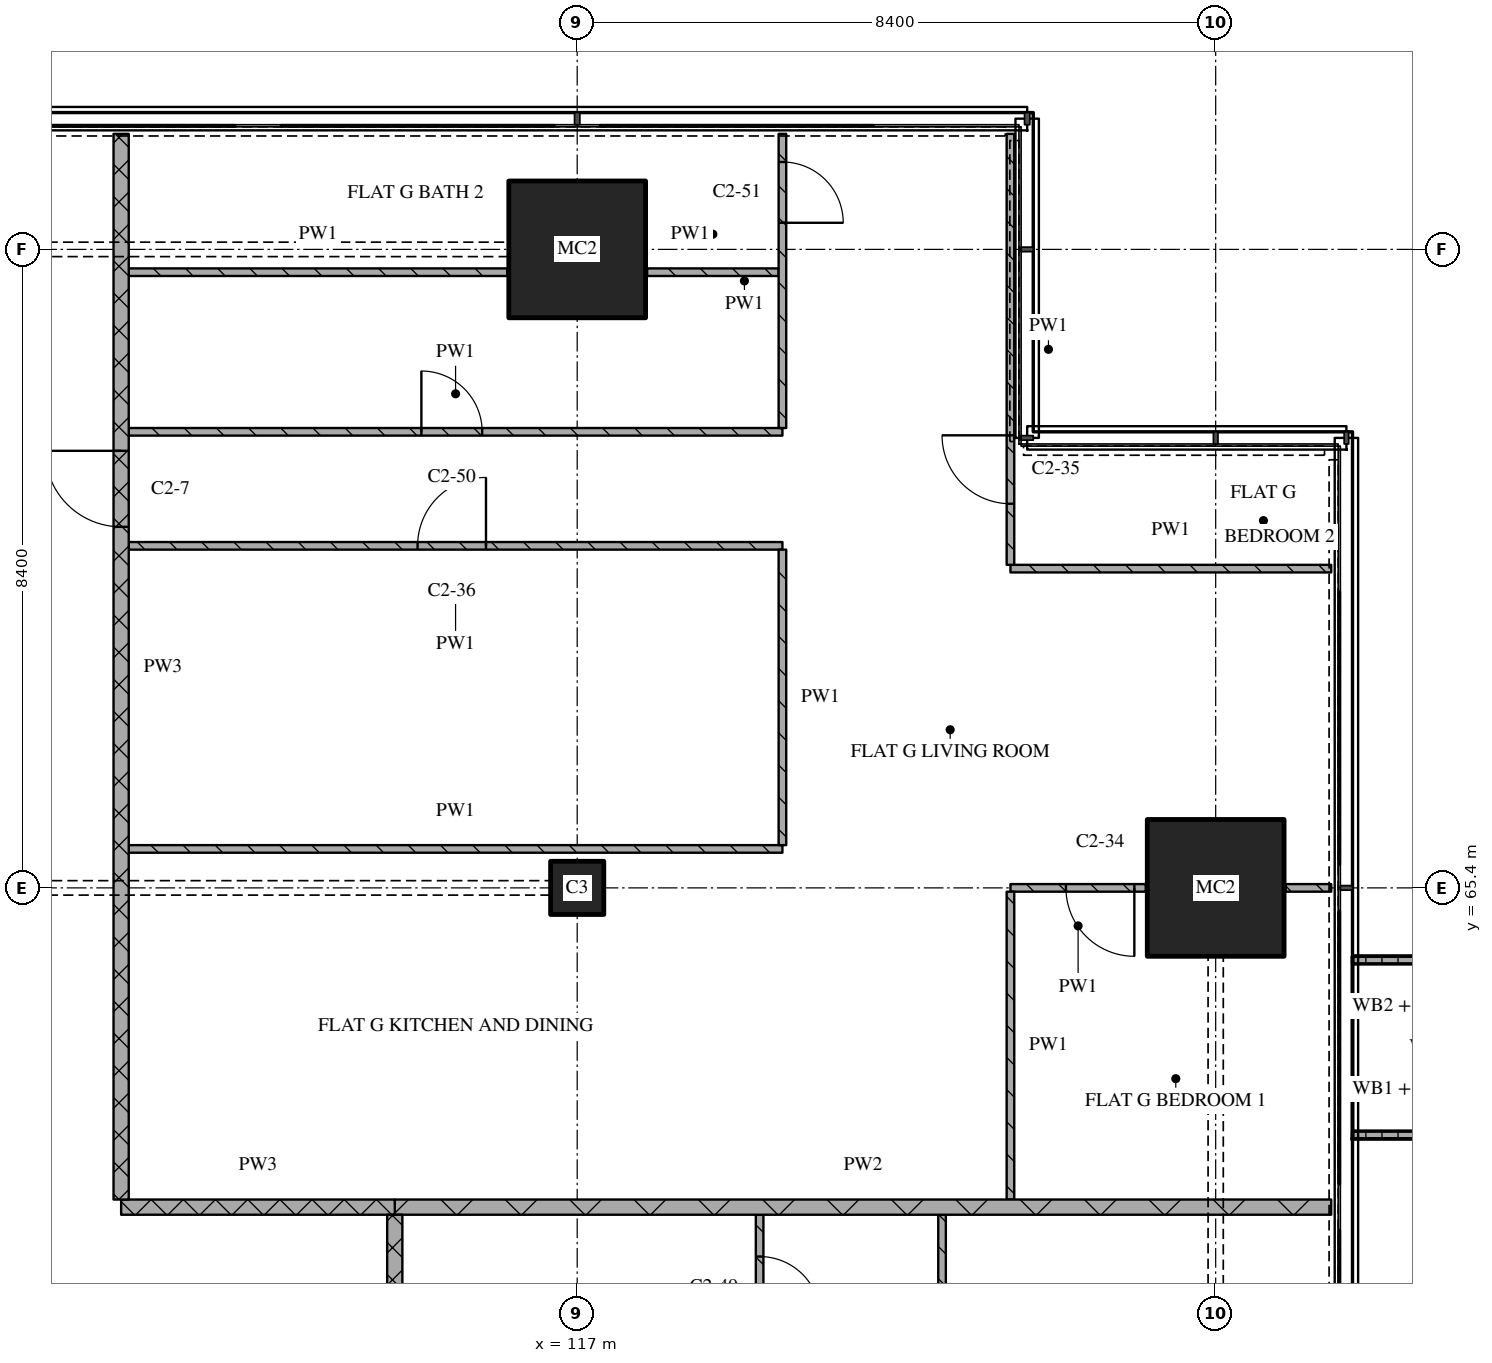
"""IFC4 building model, lengths in metres.
Left out: names, types, materials, properties, quantities, classifications, styles, units other than length and angle.
Written with IfcOpenShell. Run it as: python <this file> out.ifc"""

import sys

from ifc_helpers import new_model, si_unit, direction, frame, frame_2d, origin, origin_2d, place, context, subcontext, project, spatial, polyline, rectangle, outline, extrude, element, fill, save


model = new_model("IFC4")
c1 = context("Model", 3, precision=1e-05, world=origin(), true_north=direction((0.0, 1.0)))
c2 = subcontext(c1, "Body", "Model", "MODEL_VIEW")
j1 = project(units=[si_unit("LENGTHUNIT", "METRE"), si_unit("PLANEANGLEUNIT", "RADIAN")], contexts=[c1])
p1 = place(None, origin())
s1 = spatial("IfcSite", under=j1, at=p1, CompositionType="ELEMENT")
p2 = place(p1, origin())
s2 = spatial("IfcBuilding", under=s1, at=p2, CompositionType="ELEMENT")
p3 = place(p2, frame((0.0, 0.0, 158.25)))
s3 = spatial("IfcBuildingStorey", under=s2, at=p3, CompositionType="ELEMENT", Elevation=158.25)
p4 = place(p3, frame((117.0, 65.4, 0.0), z_axis=(0.0, 0.0, 1.0), x_axis=(1.0, 0.0, 0.0)))
e1 = element("IfcColumn", 1, at=p4, inside=s3, PredefinedType="COLUMN", context=c2, shape_type="SweptSolid", body=[
    extrude(rectangle(XDim=0.7, YDim=0.7, at=origin_2d()), origin(), (0.0, 0.0, 1.0), 3.6),
])
for number, where, z_axis, x_axis in (
    (2, (117.0, 73.8, 0.0), (0.0, 0.0, 1.0), (1.0, 0.0, 0.0)),
    (3, (125.4, 65.4, 0.0), (0.0, 0.0, 1.0), (1.0, 0.0, 0.0)),
):
    element("IfcColumn", number, at=place(p3, frame(where, z_axis=z_axis, x_axis=x_axis)), inside=s3, PredefinedType="COLUMN", context=c2, shape_type="SweptSolid", body=[
        extrude(rectangle(XDim=1.8, YDim=1.8, at=origin_2d()), origin(), (0.0, 0.0, 1.0), 3.6),
    ])
p5 = place(p3, origin())
e4 = element("IfcWall", 4, at=p5, inside=s3, PredefinedType="SOLIDWALL", context=c2, shape_type="SweptSolid", body=[
    extrude(outline(polyline([(127.2, 62.1), (127.2, 62.2), (128.7, 62.2), (128.7, 64.4), (127.2, 64.4), (127.2, 64.5), (128.8, 64.5), (128.8, 62.1), (127.2, 62.1)])), origin(), (0.0, 0.0, 1.0), 1.0),
])
p6 = place(p3, frame((111.0, 61.2, 0.0), z_axis=(0.0, 0.0, 1.0), x_axis=(1.0, 0.0, 0.0)))
e5 = element("IfcWall", 5, at=p6, inside=s3, PredefinedType="PARTITIONING", context=c2, shape_type="SweptSolid", body=[
    extrude(rectangle(XDim=3.6, YDim=0.2, at=frame_2d((1.8, 0.0))), origin(), (0.0, 0.0, 1.0), 3.32),
])
p7 = place(p3, frame((114.6, 61.2, 0.0), z_axis=(0.0, 0.0, 1.0), x_axis=(1.0, 0.0, 0.0)))
e6 = element("IfcWall", 6, at=p7, inside=s3, PredefinedType="PARTITIONING", context=c2, shape_type="SweptSolid", body=[
    extrude(rectangle(XDim=12.32, YDim=0.2, at=frame_2d((6.16, 0.0))), origin(), (0.0, 0.0, 1.0), 3.32),
])
p8 = place(p3, frame((124.48, 65.4, 0.0), z_axis=(0.0, 0.0, 1.0), x_axis=(-1.0, 0.0, 0.0)))
e7 = element("IfcWall", 7, at=p8, inside=s3, PredefinedType="PARTITIONING", context=c2, shape_type="SweptSolid", body=[
    extrude(rectangle(XDim=1.78, YDim=0.1, at=frame_2d((0.89, 0.0))), origin(), (0.0, 0.0, 1.0), 3.32),
])
p9 = place(p8, frame((0.15, 0.0, 0.0)))
e8 = element("IfcOpeningElement", 8, at=p9, cuts=e7, PredefinedType="OPENING", context=c2, shape_type="SweptSolid", body=[
    extrude(rectangle(XDim=0.9, YDim=2.1, at=frame_2d((0.45, 1.05))), frame((0.0, 0.06, 0.0), z_axis=(0.0, -1.0, 0.0), x_axis=(1.0, 0.0, 0.0)), (0.0, 0.0, 1.0), 0.12),
])
p10 = place(p3, frame((126.32, 65.4, 0.0), z_axis=(0.0, 0.0, 1.0), x_axis=(1.0, 0.0, 0.0)))
e9 = element("IfcWall", 9, at=p10, inside=s3, PredefinedType="PARTITIONING", context=c2, shape_type="SweptSolid", body=[
    extrude(rectangle(XDim=0.6, YDim=0.1, at=frame_2d((0.3, 0.0))), origin(), (0.0, 0.0, 1.0), 3.32),
])
p11 = place(p3, frame((111.1, 65.913, 0.0), z_axis=(0.0, 0.0, 1.0), x_axis=(1.0, 0.0, 0.0)))
e10 = element("IfcWall", 10, at=p11, inside=s3, PredefinedType="PARTITIONING", context=c2, shape_type="SweptSolid", body=[
    extrude(rectangle(XDim=8.6, YDim=0.1, at=frame_2d((4.3, 0.0))), origin(), (0.0, 0.0, 1.0), 3.32),
])
p12 = place(p3, frame((122.7, 69.6, 0.0), z_axis=(0.0, 0.0, 1.0), x_axis=(1.0, 0.0, 0.0)))
e11 = element("IfcWall", 11, at=p12, inside=s3, PredefinedType="PARTITIONING", context=c2, shape_type="SweptSolid", body=[
    extrude(rectangle(XDim=4.22, YDim=0.1, at=frame_2d((2.11, 0.0))), origin(), (0.0, 0.0, 1.0), 3.32),
])
p13 = place(p3, frame((119.7, 69.9, 0.0), z_axis=(0.0, 0.0, 1.0), x_axis=(-1.0, 0.0, 0.0)))
e12 = element("IfcWall", 12, at=p13, inside=s3, PredefinedType="PARTITIONING", context=c2, shape_type="SweptSolid", body=[
    extrude(rectangle(XDim=8.6, YDim=0.1, at=frame_2d((4.3, 0.0))), origin(), (0.0, 0.0, 1.0), 3.32),
])
p14 = place(p13, frame((3.9, 0.0, 0.0)))
e13 = element("IfcOpeningElement", 13, at=p14, cuts=e12, PredefinedType="OPENING", context=c2, shape_type="SweptSolid", body=[
    extrude(rectangle(XDim=0.9, YDim=2.1, at=frame_2d((0.45, 1.05))), frame((0.0, 0.06, 0.0), z_axis=(0.0, -1.0, 0.0), x_axis=(1.0, 0.0, 0.0)), (0.0, 0.0, 1.0), 0.12),
])
p15 = place(p3, frame((111.1, 71.4, 0.0), z_axis=(0.0, 0.0, 1.0), x_axis=(1.0, 0.0, 0.0)))
e14 = element("IfcWall", 14, at=p15, inside=s3, PredefinedType="PARTITIONING", context=c2, shape_type="SweptSolid", body=[
    extrude(rectangle(XDim=8.6, YDim=0.1, at=frame_2d((4.3, 0.0))), origin(), (0.0, 0.0, 1.0), 3.32),
])
p16 = place(p15, frame((3.85, 0.0, 0.0)))
e15 = element("IfcOpeningElement", 15, at=p16, cuts=e14, PredefinedType="OPENING", context=c2, shape_type="SweptSolid", body=[
    extrude(rectangle(XDim=0.8, YDim=2.1, at=frame_2d((0.4, 1.05))), frame((0.0, 0.06, 0.0), z_axis=(0.0, -1.0, 0.0), x_axis=(1.0, 0.0, 0.0)), (0.0, 0.0, 1.0), 0.12),
])
p17 = place(p3, frame((111.1, 73.5, 0.0), z_axis=(0.0, 0.0, 1.0), x_axis=(1.0, 0.0, 0.0)))
e16 = element("IfcWall", 16, at=p17, inside=s3, PredefinedType="PARTITIONING", context=c2, shape_type="SweptSolid", body=[
    extrude(rectangle(XDim=4.98, YDim=0.1, at=frame_2d((2.49, 0.0))), origin(), (0.0, 0.0, 1.0), 3.32),
])
p18 = place(p3, frame((117.92, 73.5, 0.0), z_axis=(0.0, 0.0, 1.0), x_axis=(1.0, 0.0, 0.0)))
e17 = element("IfcWall", 17, at=p18, inside=s3, PredefinedType="PARTITIONING", context=c2, shape_type="SweptSolid", body=[
    extrude(rectangle(XDim=1.73, YDim=0.1, at=frame_2d((0.865, 0.0))), origin(), (0.0, 0.0, 1.0), 3.32),
])
p19 = place(p3, frame((111.0, 75.32, 0.0), z_axis=(0.0, 0.0, 1.0), x_axis=(0.0, -1.0, 0.0)))
e18 = element("IfcWall", 18, at=p19, inside=s3, PredefinedType="PARTITIONING", context=c2, shape_type="SweptSolid", body=[
    extrude(rectangle(XDim=14.02, YDim=0.2, at=frame_2d((7.01, 0.0))), origin(), (0.0, 0.0, 1.0), 3.32),
])
p20 = place(p19, frame((4.17, 0.0, 0.0)))
e19 = element("IfcOpeningElement", 19, at=p20, cuts=e18, PredefinedType="OPENING", context=c2, shape_type="SweptSolid", body=[
    extrude(rectangle(XDim=1.0, YDim=2.1, at=frame_2d((0.5, 1.05))), frame((0.0, 0.11, 0.0), z_axis=(0.0, -1.0, 0.0), x_axis=(1.0, 0.0, 0.0)), (0.0, 0.0, 1.0), 0.22),
])
p21 = place(p3, frame((114.6, 61.1, 0.0), z_axis=(0.0, 0.0, 1.0), x_axis=(0.0, -1.0, 0.0)))
e20 = element("IfcWall", 20, at=p21, inside=s3, PredefinedType="PARTITIONING", context=c2, shape_type="SweptSolid", body=[
    extrude(rectangle(XDim=17.8, YDim=0.2, at=frame_2d((8.9, 0.0))), origin(), (0.0, 0.0, 1.0), 3.32),
])
p22 = place(p21, frame((5.25, 0.0, 0.0)))
e21 = element("IfcOpeningElement", 21, at=p22, cuts=e20, PredefinedType="OPENING", context=c2, shape_type="SweptSolid", body=[
    extrude(rectangle(XDim=1.0, YDim=2.1, at=frame_2d((0.5, 1.05))), frame((0.0, 0.11, 0.0), z_axis=(0.0, -1.0, 0.0), x_axis=(1.0, 0.0, 0.0)), (0.0, 0.0, 1.0), 0.22),
])
p23 = place(p3, frame((119.4, 56.15, 0.0), z_axis=(0.0, 0.0, 1.0), x_axis=(0.0, 1.0, 0.0)))
e22 = element("IfcWall", 22, at=p23, inside=s3, PredefinedType="PARTITIONING", context=c2, shape_type="SweptSolid", body=[
    extrude(rectangle(XDim=4.95, YDim=0.1, at=frame_2d((2.475, 0.0))), origin(), (0.0, 0.0, 1.0), 3.32),
])
p24 = place(p23, frame((3.6, 0.0, 0.0)))
e23 = element("IfcOpeningElement", 23, at=p24, cuts=e22, PredefinedType="OPENING", context=c2, shape_type="SweptSolid", body=[
    extrude(rectangle(XDim=0.8, YDim=2.1, at=frame_2d((0.4, 1.05))), frame((0.0, 0.06, 0.0), z_axis=(0.0, -1.0, 0.0), x_axis=(1.0, 0.0, 0.0)), (0.0, 0.0, 1.0), 0.12),
])
p25 = place(p3, frame((119.7, 69.85, 0.0), z_axis=(0.0, 0.0, 1.0), x_axis=(0.0, -1.0, 0.0)))
e24 = element("IfcWall", 24, at=p25, inside=s3, PredefinedType="PARTITIONING", context=c2, shape_type="SweptSolid", body=[
    extrude(rectangle(XDim=3.887, YDim=0.1, at=frame_2d((1.944, 0.0))), origin(), (0.0, 0.0, 1.0), 3.32),
])
p26 = place(p3, frame((119.7, 71.45, 0.0), z_axis=(0.0, 0.0, 1.0), x_axis=(0.0, 1.0, 0.0)))
e25 = element("IfcWall", 25, at=p26, inside=s3, PredefinedType="PARTITIONING", context=c2, shape_type="SweptSolid", body=[
    extrude(rectangle(XDim=3.87, YDim=0.1, at=frame_2d((1.935, 0.0))), origin(), (0.0, 0.0, 1.0), 3.32),
])
p27 = place(p26, frame((2.7, 0.0, 0.0)))
e26 = element("IfcOpeningElement", 26, at=p27, cuts=e25, PredefinedType="OPENING", context=c2, shape_type="SweptSolid", body=[
    extrude(rectangle(XDim=0.8, YDim=2.1, at=frame_2d((0.4, 1.05))), frame((0.0, 0.06, 0.0), z_axis=(0.0, -1.0, 0.0), x_axis=(1.0, 0.0, 0.0)), (0.0, 0.0, 1.0), 0.12),
])
p28 = place(p3, frame((121.8, 61.1, 0.0), z_axis=(0.0, 0.0, 1.0), x_axis=(0.0, -1.0, 0.0)))
e27 = element("IfcWall", 27, at=p28, inside=s3, PredefinedType="PARTITIONING", context=c2, shape_type="SweptSolid", body=[
    extrude(rectangle(XDim=8.25, YDim=0.1, at=frame_2d((4.125, 0.0))), origin(), (0.0, 0.0, 1.0), 3.32),
])
p29 = place(p28, frame((3.65, 0.0, 0.0)))
e28 = element("IfcOpeningElement", 28, at=p29, cuts=e27, PredefinedType="OPENING", context=c2, shape_type="SweptSolid", body=[
    extrude(rectangle(XDim=0.9, YDim=2.1, at=frame_2d((0.45, 1.05))), frame((0.0, 0.06, 0.0), z_axis=(0.0, -1.0, 0.0), x_axis=(1.0, 0.0, 0.0)), (0.0, 0.0, 1.0), 0.12),
])
p30 = place(p3, frame((122.7, 65.35, 0.0), z_axis=(0.0, 0.0, 1.0), x_axis=(0.0, -1.0, 0.0)))
e29 = element("IfcWall", 29, at=p30, inside=s3, PredefinedType="PARTITIONING", context=c2, shape_type="SweptSolid", body=[
    extrude(rectangle(XDim=4.05, YDim=0.1, at=frame_2d((2.025, 0.0))), origin(), (0.0, 0.0, 1.0), 3.32),
])
p31 = place(p3, frame((122.7, 75.32, 0.0), z_axis=(0.0, 0.0, 1.0), x_axis=(0.0, -1.0, 0.0)))
e30 = element("IfcWall", 30, at=p31, inside=s3, PredefinedType="PARTITIONING", context=c2, shape_type="SweptSolid", body=[
    extrude(rectangle(XDim=5.67, YDim=0.1, at=frame_2d((2.835, 0.0))), origin(), (0.0, 0.0, 1.0), 3.32),
])
p32 = place(p31, frame((3.966, 0.0, 0.0)))
e31 = element("IfcOpeningElement", 31, at=p32, cuts=e30, PredefinedType="OPENING", context=c2, shape_type="SweptSolid", body=[
    extrude(rectangle(XDim=0.9, YDim=2.1, at=frame_2d((0.45, 1.05))), frame((0.0, 0.06, 0.0), z_axis=(0.0, -1.0, 0.0), x_axis=(1.0, 0.0, 0.0)), (0.0, 0.0, 1.0), 0.12),
])
p33 = place(p9, origin())
e32 = element("IfcDoor", 32, at=p33, inside=s3, OperationType="SINGLE_SWING_LEFT", PredefinedType="DOOR", context=c2, shape_type="SweptSolid", body=[
    extrude(rectangle(XDim=0.9, YDim=2.1, at=frame_2d((0.45, 1.05))), frame((0.0, 0.025, 0.0), z_axis=(0.0, -1.0, 0.0), x_axis=(1.0, 0.0, 0.0)), (0.0, 0.0, 1.0), 0.05),
])
fill(e8, e32)
p34 = place(p14, origin())
e33 = element("IfcDoor", 33, at=p34, inside=s3, OperationType="SINGLE_SWING_RIGHT", PredefinedType="DOOR", context=c2, shape_type="SweptSolid", body=[
    extrude(rectangle(XDim=0.9, YDim=2.1, at=frame_2d((0.45, 1.05))), frame((0.0, 0.025, 0.0), z_axis=(0.0, -1.0, 0.0), x_axis=(1.0, 0.0, 0.0)), (0.0, 0.0, 1.0), 0.05),
])
fill(e13, e33)
p35 = place(p16, origin())
e34 = element("IfcDoor", 34, at=p35, inside=s3, OperationType="SINGLE_SWING_LEFT", PredefinedType="DOOR", context=c2, shape_type="SweptSolid", body=[
    extrude(rectangle(XDim=0.8, YDim=2.1, at=frame_2d((0.4, 1.05))), frame((0.0, 0.025, 0.0), z_axis=(0.0, -1.0, 0.0), x_axis=(1.0, 0.0, 0.0)), (0.0, 0.0, 1.0), 0.05),
])
fill(e15, e34)
p36 = place(p20, origin())
e35 = element("IfcDoor", 35, at=p36, inside=s3, OperationType="SINGLE_SWING_RIGHT", PredefinedType="DOOR", context=c2, shape_type="SweptSolid", body=[
    extrude(rectangle(XDim=1.0, YDim=2.1, at=frame_2d((0.5, 1.05))), frame((0.0, 0.025, 0.0), z_axis=(0.0, -1.0, 0.0), x_axis=(1.0, 0.0, 0.0)), (0.0, 0.0, 1.0), 0.05),
])
fill(e19, e35)
p37 = place(p24, origin())
e36 = element("IfcDoor", 36, at=p37, inside=s3, OperationType="SINGLE_SWING_RIGHT", PredefinedType="DOOR", context=c2, shape_type="SweptSolid", body=[
    extrude(rectangle(XDim=0.8, YDim=2.1, at=frame_2d((0.4, 1.05))), frame((0.0, 0.025, 0.0), z_axis=(0.0, -1.0, 0.0), x_axis=(1.0, 0.0, 0.0)), (0.0, 0.0, 1.0), 0.05),
])
fill(e23, e36)
p38 = place(p27, origin())
e37 = element("IfcDoor", 37, at=p38, inside=s3, OperationType="SINGLE_SWING_RIGHT", PredefinedType="DOOR", context=c2, shape_type="SweptSolid", body=[
    extrude(rectangle(XDim=0.8, YDim=2.1, at=frame_2d((0.4, 1.05))), frame((0.0, 0.025, 0.0), z_axis=(0.0, -1.0, 0.0), x_axis=(1.0, 0.0, 0.0)), (0.0, 0.0, 1.0), 0.05),
])
fill(e26, e37)
p39 = place(p32, origin())
e38 = element("IfcDoor", 38, at=p39, inside=s3, OperationType="SINGLE_SWING_RIGHT", PredefinedType="DOOR", context=c2, shape_type="SweptSolid", body=[
    extrude(rectangle(XDim=0.9, YDim=2.1, at=frame_2d((0.45, 1.05))), frame((0.0, 0.025, 0.0), z_axis=(0.0, -1.0, 0.0), x_axis=(1.0, 0.0, 0.0)), (0.0, 0.0, 1.0), 0.05),
])
fill(e31, e38)
save(model, sys.argv[1])
